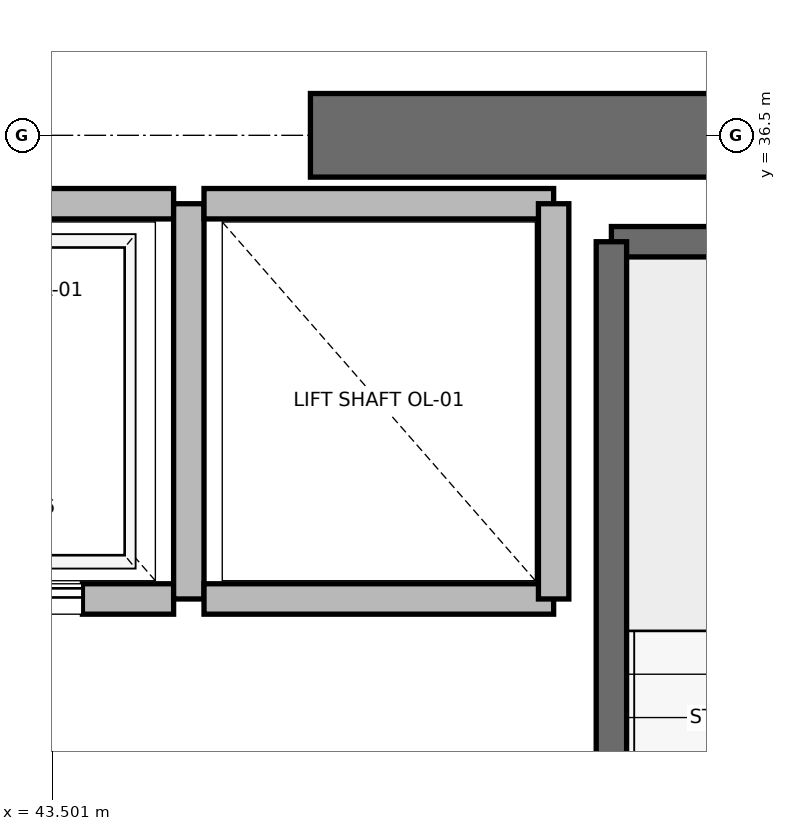
"""IFC4 building model, lengths in metres.
Left out: names, types, materials, properties, quantities, classifications, styles, units other than length and angle.
Written with IfcOpenShell. Run it as: python <this file> out.ifc"""

import sys

from ifc_helpers import new_model, si_unit, direction, frame, frame_2d, origin, place, context, subcontext, project, spatial, rectangle, extrude, element, fill, save


model = new_model("IFC4")
c1 = context("Model", 3, precision=1e-05, world=origin(), true_north=direction((0.0, 1.0)))
c2 = subcontext(c1, "Body", "Model", "MODEL_VIEW")
j1 = project(units=[si_unit("LENGTHUNIT", "METRE"), si_unit("PLANEANGLEUNIT", "RADIAN")], contexts=[c1])
p1 = place(None, origin())
s1 = spatial("IfcSite", under=j1, at=p1, CompositionType="ELEMENT")
p2 = place(p1, origin())
s2 = spatial("IfcBuilding", under=s1, at=p2, CompositionType="ELEMENT")
p3 = place(p2, frame((0.0, 0.0, 238.2)))
s3 = spatial("IfcBuildingStorey", under=s2, at=p3, CompositionType="ELEMENT", Elevation=238.2)
p4 = place(p3, frame((45.2, 36.5, 0.0), z_axis=(0.0, 0.0, 1.0), x_axis=(1.0, 0.0, 0.0)))
e1 = element("IfcWall", 1, at=p4, inside=s3, PredefinedType="SHEAR", context=c2, shape_type="SweptSolid", body=[
    extrude(rectangle(XDim=5.8, YDim=0.55, at=frame_2d((2.9, 0.0))), origin(), (0.0, 0.0, 1.0), 4.785),
])
p5 = place(p3, frame((47.18, 35.8, 0.0), z_axis=(0.0, 0.0, 1.0), x_axis=(1.0, 0.0, 0.0)))
e2 = element("IfcWall", 2, at=p5, inside=s3, PredefinedType="SOLIDWALL", context=c2, shape_type="SweptSolid", body=[
    extrude(rectangle(XDim=3.12, YDim=0.2, at=frame_2d((1.56, 0.0))), origin(), (0.0, 0.0, 1.0), 4.785),
])
p6 = place(p3, frame((47.18, 27.62, 0.0), z_axis=(0.0, 0.0, 1.0), x_axis=(0.0, 1.0, 0.0)))
e3 = element("IfcWall", 3, at=p6, inside=s3, PredefinedType="SOLIDWALL", context=c2, shape_type="SweptSolid", body=[
    extrude(rectangle(XDim=8.18, YDim=0.2, at=frame_2d((4.09, 0.0))), origin(), (0.0, 0.0, 1.0), 4.785),
])
p7 = place(p3, frame((42.0, 33.45, 0.0), z_axis=(0.0, 0.0, 1.0), x_axis=(1.0, 0.0, 0.0)))
e4 = element("IfcWall", 4, at=p7, inside=s3, PredefinedType="SOLIDWALL", context=c2, shape_type="SweptSolid", body=[
    extrude(rectangle(XDim=2.3, YDim=0.2, at=frame_2d((1.15, 0.0))), origin(), (0.0, 0.0, 1.0), 4.785),
])
p8 = place(p7, frame((0.6, 0.0, 0.0)))
e5 = element("IfcOpeningElement", 5, at=p8, cuts=e4, PredefinedType="OPENING", context=c2, shape_type="SweptSolid", body=[
    extrude(rectangle(XDim=1.1, YDim=2.2, at=frame_2d((0.55, 1.1))), frame((0.0, 0.1, 0.0), z_axis=(0.0, -1.0, 0.0), x_axis=(1.0, 0.0, 0.0)), (0.0, 0.0, 1.0), 0.2),
])
p9 = place(p3, frame((44.3, 36.05, 0.0), z_axis=(0.0, 0.0, 1.0), x_axis=(-1.0, 0.0, 0.0)))
e6 = element("IfcWall", 6, at=p9, inside=s3, PredefinedType="SOLIDWALL", context=c2, shape_type="SweptSolid", body=[
    extrude(rectangle(XDim=2.3, YDim=0.2, at=frame_2d((1.15, 0.0))), origin(), (0.0, 0.0, 1.0), 3.765),
])
p10 = place(p3, frame((44.4, 33.45, 0.0), z_axis=(0.0, 0.0, 1.0), x_axis=(0.0, 1.0, 0.0)))
e7 = element("IfcWall", 7, at=p10, inside=s3, PredefinedType="SOLIDWALL", context=c2, shape_type="SweptSolid", body=[
    extrude(rectangle(XDim=2.6, YDim=0.2, at=frame_2d((1.3, 0.0))), origin(), (0.0, 0.0, 1.0), 3.765),
])
p11 = place(p3, frame((44.5, 33.45, 0.0), z_axis=(0.0, 0.0, 1.0), x_axis=(1.0, 0.0, 0.0)))
e8 = element("IfcWall", 8, at=p11, inside=s3, PredefinedType="SOLIDWALL", context=c2, shape_type="SweptSolid", body=[
    extrude(rectangle(XDim=2.3, YDim=0.2, at=frame_2d((1.15, 0.0))), origin(), (0.0, 0.0, 1.0), 4.785),
])
p12 = place(p3, frame((46.8, 36.05, 0.0), z_axis=(0.0, 0.0, 1.0), x_axis=(-1.0, 0.0, 0.0)))
e9 = element("IfcWall", 9, at=p12, inside=s3, PredefinedType="SOLIDWALL", context=c2, shape_type="SweptSolid", body=[
    extrude(rectangle(XDim=2.3, YDim=0.2, at=frame_2d((1.15, 0.0))), origin(), (0.0, 0.0, 1.0), 3.765),
])
p13 = place(p3, frame((46.8, 33.45, 0.0), z_axis=(0.0, 0.0, 1.0), x_axis=(0.0, 1.0, 0.0)))
e10 = element("IfcWall", 10, at=p13, inside=s3, PredefinedType="SOLIDWALL", context=c2, shape_type="SweptSolid", body=[
    extrude(rectangle(XDim=2.6, YDim=0.2, at=frame_2d((1.3, 0.0))), origin(), (0.0, 0.0, 1.0), 4.785),
])
p14 = place(p8, origin())
e11 = element("IfcDoor", 11, at=p14, inside=s3, OperationType="SLIDING_TO_RIGHT", PredefinedType="DOOR", context=c2, shape_type="SweptSolid", body=[
    extrude(rectangle(XDim=1.1, YDim=2.2, at=frame_2d((0.55, 1.1))), frame((0.0, 0.025, 0.0), z_axis=(0.0, -1.0, 0.0), x_axis=(1.0, 0.0, 0.0)), (0.0, 0.0, 1.0), 0.05),
])
fill(e5, e11)
save(model, sys.argv[1])
